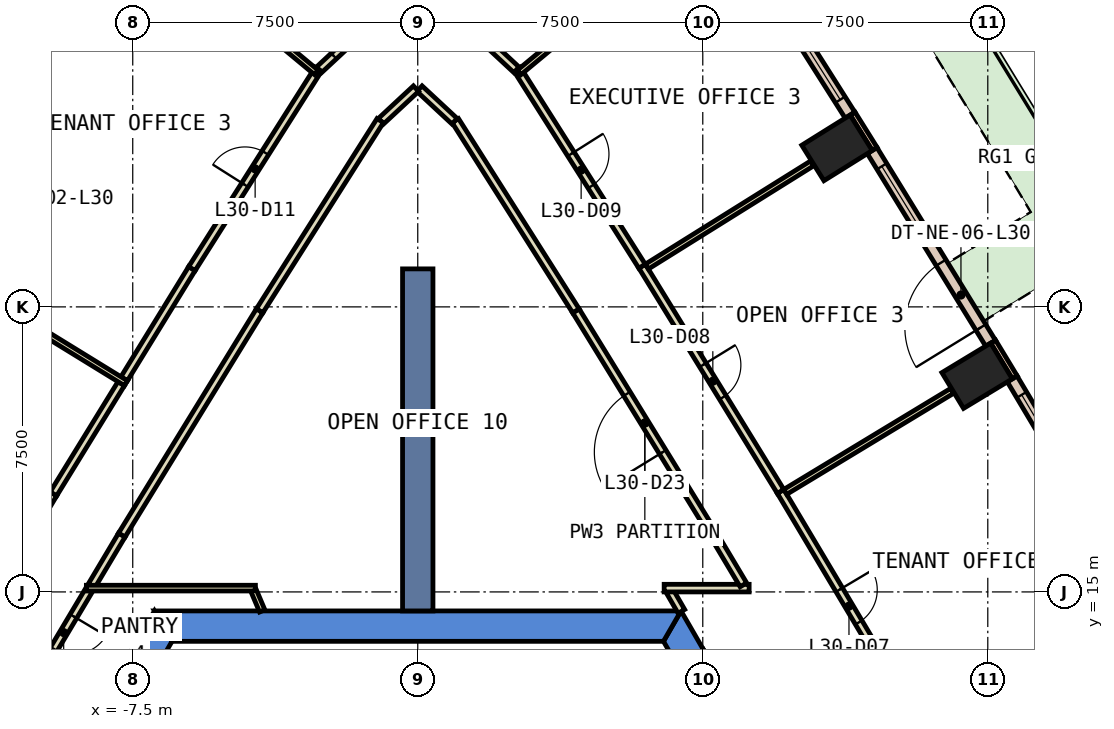
"""IFC4 building model, lengths in metres.
Left out: names, types, materials, properties, quantities, classifications, styles, units other than length and angle.
Written with IfcOpenShell. Run it as: python <this file> out.ifc"""

import sys

from ifc_helpers import new_model, si_unit, direction, frame, frame_2d, origin, origin_2d, place, context, subcontext, project, spatial, polyline, rectangle, outline, extrude, element, fill, save


model = new_model("IFC4")
c1 = context("Model", 3, precision=1e-05, world=origin(), true_north=direction((0.0, 1.0)))
c2 = subcontext(c1, "Body", "Model", "MODEL_VIEW")
j1 = project(units=[si_unit("LENGTHUNIT", "METRE"), si_unit("PLANEANGLEUNIT", "RADIAN")], contexts=[c1])
p1 = place(None, origin())
s1 = spatial("IfcSite", under=j1, at=p1, CompositionType="ELEMENT")
p2 = place(p1, origin())
s2 = spatial("IfcBuilding", under=s1, at=p2, CompositionType="ELEMENT")
p3 = place(p2, frame((0.0, 0.0, 138.2)))
s3 = spatial("IfcBuildingStorey", under=s2, at=p3, CompositionType="ELEMENT", Elevation=138.2)
for number, where, z_axis, x_axis in (
    (1, (14.719, 20.688, 0.0), (0.0, 0.0, 1.0), (-0.518, 0.855, 0.0)),
    (2, (11.033, 26.684, 0.0), (0.0, 0.0, 1.0), (-0.53, 0.848, 0.0)),
):
    element("IfcColumn", number, at=place(p3, frame(where, z_axis=z_axis, x_axis=x_axis)), inside=s3, PredefinedType="COLUMN", context=c2, shape_type="SweptSolid", body=[
        extrude(rectangle(XDim=1.1, YDim=1.5, at=origin_2d()), origin(), (0.0, 0.0, 1.0), 3.8),
    ])
p4 = place(p3, frame((0.0, 0.0, -0.6)))
e3 = element("IfcWall", 3, at=p4, inside=s3, PredefinedType="SHEAR", context=c2, shape_type="SweptSolid", body=[
    extrude(outline(polyline([(6.824, 13.08), (7.517, 13.48), (6.928, 14.5), (6.466, 13.7), (6.824, 13.08)])), origin(), (0.0, 0.0, 1.0), 4.4),
])
p5 = place(p3, frame((0.0, 0.0, -0.6)))
e4 = element("IfcWall", 4, at=p5, inside=s3, PredefinedType="SHEAR", context=c2, shape_type="SweptSolid", body=[
    extrude(outline(polyline([(6.928, 14.5), (-6.928, 14.5), (-6.466, 13.7), (6.466, 13.7), (6.928, 14.5)])), origin(), (0.0, 0.0, 1.0), 4.4),
])
p6 = place(p3, frame((0.0, 0.0, -0.6)))
e5 = element("IfcWall", 5, at=p6, inside=s3, PredefinedType="SHEAR", context=c2, shape_type="SweptSolid", body=[
    extrude(outline(polyline([(-12.267, 5.252), (-11.575, 4.852), (-6.466, 13.7), (-6.928, 14.5), (-12.267, 5.252)])), origin(), (0.0, 0.0, 1.0), 4.4),
])
p7 = place(p3, frame((0.0, 14.5, -0.6), z_axis=(0.0, 0.0, 1.0), x_axis=(0.0, 1.0, 0.0)))
e6 = element("IfcWall", 6, at=p7, inside=s3, PredefinedType="SHEAR", context=c2, shape_type="SweptSolid", body=[
    extrude(rectangle(XDim=9.0, YDim=0.8, at=frame_2d((4.5, 0.0))), origin(), (0.0, 0.0, 1.0), 4.4),
])
for number, where, z_axis, x_axis in (
    (7, (15.71, 20.645, 0.0), (0.0, 0.0, 1.0), (-0.518, 0.855, 0.0)),
    (8, (12.024, 26.655, 0.0), (0.0, 0.0, 1.0), (-0.53, 0.848, 0.0)),
):
    element("IfcWall", number, at=place(p3, frame(where, z_axis=z_axis, x_axis=x_axis)), inside=s3, PredefinedType="STANDARD", context=c2, shape_type="SweptSolid", body=[
        extrude(rectangle(XDim=1.1, YDim=0.15, at=frame_2d((0.55, 0.0))), origin(), (0.0, 0.0, 1.0), 3.8),
    ])
p8 = place(p3, frame((18.688, 15.493, 0.0), z_axis=(0.0, 0.0, 1.0), x_axis=(-0.511856715331, 0.859070836992, 0.0)))
e9 = element("IfcWall", 9, at=p8, inside=s3, PredefinedType="STANDARD", context=c2, shape_type="SweptSolid", body=[
    extrude(rectangle(XDim=5.951, YDim=0.3, at=frame_2d((2.975, 0.0))), origin(), (0.0, 0.0, 1.0), 3.8),
])
p9 = place(p8, frame((0.488, 0.0, 0.9)))
e10 = element("IfcOpeningElement", 10, at=p9, cuts=e9, PredefinedType="OPENING", context=c2, shape_type="SweptSolid", body=[
    extrude(rectangle(XDim=2.0, YDim=2.6, at=frame_2d((1.0, 1.3))), frame((0.0, 0.16, 0.0), z_axis=(0.0, -1.0, 0.0), x_axis=(1.0, 0.0, 0.0)), (0.0, 0.0, 1.0), 0.32),
])
p10 = place(p8, frame((3.463, 0.0, 0.9)))
e11 = element("IfcOpeningElement", 11, at=p10, cuts=e9, PredefinedType="OPENING", context=c2, shape_type="SweptSolid", body=[
    extrude(rectangle(XDim=2.0, YDim=2.6, at=frame_2d((1.0, 1.3))), frame((0.0, 0.16, 0.0), z_axis=(0.0, -1.0, 0.0), x_axis=(1.0, 0.0, 0.0)), (0.0, 0.0, 1.0), 0.32),
])
p11 = place(p3, frame((15.073, 21.544, 0.0), z_axis=(0.0, 0.0, 1.0), x_axis=(-0.523719731127, 0.851890628677, 0.0)))
e12 = element("IfcWall", 12, at=p11, inside=s3, PredefinedType="STANDARD", context=c2, shape_type="SweptSolid", body=[
    extrude(rectangle(XDim=5.952, YDim=0.3, at=frame_2d((2.976, 0.0))), origin(), (0.0, 0.0, 1.0), 3.8),
])
p12 = place(p11, frame((0.488, 0.0, 0.0)))
e13 = element("IfcOpeningElement", 13, at=p12, cuts=e12, PredefinedType="OPENING", context=c2, shape_type="SweptSolid", body=[
    extrude(rectangle(XDim=2.0, YDim=2.4, at=frame_2d((1.0, 1.2))), frame((0.0, 0.16, 0.0), z_axis=(0.0, -1.0, 0.0), x_axis=(1.0, 0.0, 0.0)), (0.0, 0.0, 1.0), 0.32),
])
p13 = place(p11, frame((3.464, 0.0, 0.9)))
e14 = element("IfcOpeningElement", 14, at=p13, cuts=e12, PredefinedType="OPENING", context=c2, shape_type="SweptSolid", body=[
    extrude(rectangle(XDim=2.0, YDim=2.6, at=frame_2d((1.0, 1.3))), frame((0.0, 0.16, 0.0), z_axis=(0.0, -1.0, 0.0), x_axis=(1.0, 0.0, 0.0)), (0.0, 0.0, 1.0), 0.32),
])
p14 = place(p3, frame((11.375, 27.545, 0.0), z_axis=(0.0, 0.0, 1.0), x_axis=(-0.535403761464, 0.844596242124, 0.0)))
e15 = element("IfcWall", 15, at=p14, inside=s3, PredefinedType="STANDARD", context=c2, shape_type="SweptSolid", body=[
    extrude(rectangle(XDim=5.928, YDim=0.3, at=frame_2d((2.964, 0.0))), origin(), (0.0, 0.0, 1.0), 3.8),
])
p15 = place(p14, frame((0.482, 0.0, 0.9)))
e16 = element("IfcOpeningElement", 16, at=p15, cuts=e15, PredefinedType="OPENING", context=c2, shape_type="SweptSolid", body=[
    extrude(rectangle(XDim=2.0, YDim=2.6, at=frame_2d((1.0, 1.3))), frame((0.0, 0.16, 0.0), z_axis=(0.0, -1.0, 0.0), x_axis=(1.0, 0.0, 0.0)), (0.0, 0.0, 1.0), 0.32),
])
p16 = place(p14, frame((3.446, 0.0, 0.9)))
e17 = element("IfcOpeningElement", 17, at=p16, cuts=e15, PredefinedType="OPENING", context=c2, shape_type="SweptSolid", body=[
    extrude(rectangle(XDim=2.0, YDim=2.6, at=frame_2d((1.0, 1.3))), frame((0.0, 0.16, 0.0), z_axis=(0.0, -1.0, 0.0), x_axis=(1.0, 0.0, 0.0)), (0.0, 0.0, 1.0), 0.32),
])
p17 = place(p3, frame((-8.201, 32.552, 0.0), z_axis=(0.0, 0.0, 1.0), x_axis=(-0.535403761464, -0.844596242124, 0.0)))
e18 = element("IfcWall", 18, at=p17, inside=s3, PredefinedType="STANDARD", context=c2, shape_type="SweptSolid", body=[
    extrude(rectangle(XDim=5.928, YDim=0.3, at=frame_2d((2.964, 0.0))), origin(), (0.0, 0.0, 1.0), 3.8),
])
p18 = place(p17, frame((0.482, 0.0, 0.9)))
e19 = element("IfcOpeningElement", 19, at=p18, cuts=e18, PredefinedType="OPENING", context=c2, shape_type="SweptSolid", body=[
    extrude(rectangle(XDim=2.0, YDim=2.6, at=frame_2d((1.0, 1.3))), frame((0.0, 0.16, 0.0), z_axis=(0.0, -1.0, 0.0), x_axis=(1.0, 0.0, 0.0)), (0.0, 0.0, 1.0), 0.32),
])
p19 = place(p17, frame((3.446, 0.0, 0.9)))
e20 = element("IfcOpeningElement", 20, at=p19, cuts=e18, PredefinedType="OPENING", context=c2, shape_type="SweptSolid", body=[
    extrude(rectangle(XDim=2.0, YDim=2.6, at=frame_2d((1.0, 1.3))), frame((0.0, 0.16, 0.0), z_axis=(0.0, -1.0, 0.0), x_axis=(1.0, 0.0, 0.0)), (0.0, 0.0, 1.0), 0.32),
])
p20 = place(p3, frame((-8.658, 15.036, 0.0), z_axis=(0.0, 0.0, 1.0), x_axis=(-0.511860217954, -0.859068750029, 0.0)))
e21 = element("IfcWall", 21, at=p20, inside=s3, PredefinedType="PARTITIONING", context=c2, shape_type="SweptSolid", body=[
    extrude(rectangle(XDim=2.577, YDim=0.2, at=frame_2d((1.289, 0.0))), origin(), (0.0, 0.0, 1.0), 3.8),
])
p21 = place(p20, frame((0.788, 0.0, 0.0)))
e22 = element("IfcOpeningElement", 22, at=p21, cuts=e21, PredefinedType="OPENING", context=c2, shape_type="SweptSolid", body=[
    extrude(rectangle(XDim=1.0, YDim=2.1, at=frame_2d((0.5, 1.05))), frame((0.0, 0.11, 0.0), z_axis=(0.0, -1.0, 0.0), x_axis=(1.0, 0.0, 0.0)), (0.0, 0.0, 1.0), 0.22),
])
p22 = place(p3, frame((6.937, 14.488, 0.0), z_axis=(0.0, 0.0, 1.0), x_axis=(-0.499908430952, 0.866078264744, 0.0)))
e23 = element("IfcWall", 23, at=p22, inside=s3, PredefinedType="PARTITIONING", context=c2, shape_type="SweptSolid", body=[
    extrude(rectangle(XDim=0.606, YDim=0.2, at=frame_2d((0.303, 0.0))), origin(), (0.0, 0.0, 1.0), 3.8),
])
p23 = place(p3, frame((6.484, 15.1, 0.0), z_axis=(0.0, 0.0, 1.0), x_axis=(1.0, 0.0, 0.0)))
e24 = element("IfcWall", 24, at=p23, inside=s3, PredefinedType="PARTITIONING", context=c2, shape_type="SweptSolid", body=[
    extrude(rectangle(XDim=2.236, YDim=0.2, at=frame_2d((1.118, 0.0))), origin(), (0.0, 0.0, 1.0), 3.8),
])
p24 = place(p3, frame((8.569, 15.186, 0.0), z_axis=(0.0, 0.0, 1.0), x_axis=(-0.512230585803, 0.85884796499, 0.0)))
e25 = element("IfcWall", 25, at=p24, inside=s3, PredefinedType="PARTITIONING", context=c2, shape_type="SweptSolid", body=[
    extrude(rectangle(XDim=1.523, YDim=0.2, at=frame_2d((0.761, 0.0))), origin(), (0.0, 0.0, 1.0), 3.8),
])
p25 = place(p3, frame((7.789, 16.494, 0.0), z_axis=(0.0, 0.0, 1.0), x_axis=(-0.523625371849, 0.851948631055, 0.0)))
e26 = element("IfcWall", 26, at=p25, inside=s3, PredefinedType="PARTITIONING", context=c2, shape_type="SweptSolid", body=[
    extrude(rectangle(XDim=6.927, YDim=0.2, at=frame_2d((3.463, 0.0))), origin(), (0.0, 0.0, 1.0), 3.8),
])
p26 = place(p25, frame((2.564, 0.0, 0.0)))
e27 = element("IfcOpeningElement", 27, at=p26, cuts=e26, PredefinedType="OPENING", context=c2, shape_type="SweptSolid", body=[
    extrude(rectangle(XDim=1.8, YDim=2.1, at=frame_2d((0.9, 1.05))), frame((0.0, 0.11, 0.0), z_axis=(0.0, -1.0, 0.0), x_axis=(1.0, 0.0, 0.0)), (0.0, 0.0, 1.0), 0.22),
])
p27 = place(p3, frame((4.162, 22.395, 0.0), z_axis=(0.0, 0.0, 1.0), x_axis=(-0.535496886312, 0.844537201519, 0.0)))
e28 = element("IfcWall", 28, at=p27, inside=s3, PredefinedType="PARTITIONING", context=c2, shape_type="SweptSolid", body=[
    extrude(rectangle(XDim=5.927, YDim=0.2, at=frame_2d((2.964, 0.0))), origin(), (0.0, 0.0, 1.0), 3.8),
])
for number, where, z_axis, x_axis in (
    (29, (0.968, 27.385, 0.0), (0.0, 0.0, 1.0), (-0.733, 0.681, 0.0)),
    (30, (-0.046, 28.242, 0.0), (0.0, 0.0, 1.0), (-0.733, -0.681, 0.0)),
):
    element("IfcWall", number, at=place(p3, frame(where, z_axis=z_axis, x_axis=x_axis)), inside=s3, PredefinedType="PARTITIONING", context=c2, shape_type="SweptSolid", body=[
        extrude(rectangle(XDim=1.259, YDim=0.2, at=frame_2d((0.629, 0.0))), origin(), (0.0, 0.0, 1.0), 3.8),
    ])
p28 = place(p3, frame((-0.988, 27.401, 0.0), z_axis=(0.0, 0.0, 1.0), x_axis=(-0.535496886312, -0.844537201519, 0.0)))
e31 = element("IfcWall", 31, at=p28, inside=s3, PredefinedType="PARTITIONING", context=c2, shape_type="SweptSolid", body=[
    extrude(rectangle(XDim=5.927, YDim=0.2, at=frame_2d((2.964, 0.0))), origin(), (0.0, 0.0, 1.0), 3.8),
])
p29 = place(p3, frame((-4.162, 22.395, 0.0), z_axis=(0.0, 0.0, 1.0), x_axis=(-0.523625371849, -0.851948631055, 0.0)))
e32 = element("IfcWall", 32, at=p29, inside=s3, PredefinedType="PARTITIONING", context=c2, shape_type="SweptSolid", body=[
    extrude(rectangle(XDim=6.927, YDim=0.2, at=frame_2d((3.463, 0.0))), origin(), (0.0, 0.0, 1.0), 3.8),
])
p30 = place(p3, frame((-7.789, 16.494, 0.0), z_axis=(0.0, 0.0, 1.0), x_axis=(-0.511686277462, -0.859172365394, 0.0)))
e33 = element("IfcWall", 33, at=p30, inside=s3, PredefinedType="PARTITIONING", context=c2, shape_type="SweptSolid", body=[
    extrude(rectangle(XDim=1.548, YDim=0.2, at=frame_2d((0.774, 0.0))), origin(), (0.0, 0.0, 1.0), 3.8),
])
p31 = place(p3, frame((9.548, 17.645, 0.0), z_axis=(0.0, 0.0, 1.0), x_axis=(0.511822081848, -0.859091471575, 0.0)))
e34 = element("IfcWall", 34, at=p31, inside=s3, PredefinedType="PARTITIONING", context=c2, shape_type="SweptSolid", body=[
    extrude(rectangle(XDim=7.03, YDim=0.2, at=frame_2d((3.515, 0.0))), origin(), (0.0, 0.0, 1.0), 3.8),
])
p32 = place(p31, frame((3.015, 0.0, 0.0)))
e35 = element("IfcOpeningElement", 35, at=p32, cuts=e34, PredefinedType="OPENING", context=c2, shape_type="SweptSolid", body=[
    extrude(rectangle(XDim=1.0, YDim=2.1, at=frame_2d((0.5, 1.05))), frame((0.0, 0.11, 0.0), z_axis=(0.0, -1.0, 0.0), x_axis=(1.0, 0.0, 0.0)), (0.0, 0.0, 1.0), 0.22),
])
p33 = place(p3, frame((5.904, 23.571, 0.0), z_axis=(0.0, 0.0, 1.0), x_axis=(0.523647026552, -0.851935321244, 0.0)))
e36 = element("IfcWall", 36, at=p33, inside=s3, PredefinedType="PARTITIONING", context=c2, shape_type="SweptSolid", body=[
    extrude(rectangle(XDim=6.957, YDim=0.2, at=frame_2d((3.479, 0.0))), origin(), (0.0, 0.0, 1.0), 3.8),
])
p34 = place(p33, frame((3.053, 0.0, 0.0)))
e37 = element("IfcOpeningElement", 37, at=p34, cuts=e36, PredefinedType="OPENING", context=c2, shape_type="SweptSolid", body=[
    extrude(rectangle(XDim=1.0, YDim=2.1, at=frame_2d((0.5, 1.05))), frame((0.0, 0.11, 0.0), z_axis=(0.0, -1.0, 0.0), x_axis=(1.0, 0.0, 0.0)), (0.0, 0.0, 1.0), 0.22),
])
p35 = place(p3, frame((2.616, 28.754, 0.0), z_axis=(0.0, 0.0, 1.0), x_axis=(0.535405016332, -0.844595446641, 0.0)))
e38 = element("IfcWall", 38, at=p35, inside=s3, PredefinedType="PARTITIONING", context=c2, shape_type="SweptSolid", body=[
    extrude(rectangle(XDim=6.138, YDim=0.2, at=frame_2d((3.069, 0.0))), origin(), (0.0, 0.0, 1.0), 3.8),
])
p36 = place(p35, frame((2.644, 0.0, 0.0)))
e39 = element("IfcOpeningElement", 39, at=p36, cuts=e38, PredefinedType="OPENING", context=c2, shape_type="SweptSolid", body=[
    extrude(rectangle(XDim=1.0, YDim=2.1, at=frame_2d((0.5, 1.05))), frame((0.0, 0.11, 0.0), z_axis=(0.0, -1.0, 0.0), x_axis=(1.0, 0.0, 0.0)), (0.0, 0.0, 1.0), 0.22),
])
p37 = place(p3, frame((-2.597, 28.738, 0.0), z_axis=(0.0, 0.0, 1.0), x_axis=(0.73206471367, 0.681235095249, 0.0)))
e40 = element("IfcWall", 40, at=p37, inside=s3, PredefinedType="PARTITIONING", context=c2, shape_type="SweptSolid", body=[
    extrude(rectangle(XDim=2.065, YDim=0.2, at=frame_2d((1.033, 0.0))), origin(), (0.0, 0.0, 1.0), 3.8),
])
p38 = place(p37, frame((0.532, 0.0, 0.0)))
e41 = element("IfcOpeningElement", 41, at=p38, cuts=e40, PredefinedType="OPENING", context=c2, shape_type="SweptSolid", body=[
    extrude(rectangle(XDim=1.0, YDim=2.1, at=frame_2d((0.5, 1.05))), frame((0.0, 0.11, 0.0), z_axis=(0.0, -1.0, 0.0), x_axis=(1.0, 0.0, 0.0)), (0.0, 0.0, 1.0), 0.22),
])
p39 = place(p3, frame((1.085, 30.145, 0.0), z_axis=(0.0, 0.0, 1.0), x_axis=(0.73206471367, -0.681235095249, 0.0)))
e42 = element("IfcWall", 42, at=p39, inside=s3, PredefinedType="PARTITIONING", context=c2, shape_type="SweptSolid", body=[
    extrude(rectangle(XDim=2.065, YDim=0.2, at=frame_2d((1.033, 0.0))), origin(), (0.0, 0.0, 1.0), 3.8),
])
p40 = place(p3, frame((-7.725, 20.608, 0.0), z_axis=(0.0, 0.0, 1.0), x_axis=(0.523645038298, 0.851936543333, 0.0)))
e43 = element("IfcWall", 43, at=p40, inside=s3, PredefinedType="PARTITIONING", context=c2, shape_type="SweptSolid", body=[
    extrude(rectangle(XDim=3.403, YDim=0.2, at=frame_2d((1.702, 0.0))), origin(), (0.0, 0.0, 1.0), 3.8),
])
p41 = place(p3, frame((-5.943, 23.507, 0.0), z_axis=(0.0, 0.0, 1.0), x_axis=(0.535529721247, 0.844516380931, 0.0)))
e44 = element("IfcWall", 44, at=p41, inside=s3, PredefinedType="PARTITIONING", context=c2, shape_type="SweptSolid", body=[
    extrude(rectangle(XDim=6.213, YDim=0.2, at=frame_2d((3.106, 0.0))), origin(), (0.0, 0.0, 1.0), 3.8),
])
p42 = place(p41, frame((2.607, 0.0, 0.0)))
e45 = element("IfcOpeningElement", 45, at=p42, cuts=e44, PredefinedType="OPENING", context=c2, shape_type="SweptSolid", body=[
    extrude(rectangle(XDim=1.0, YDim=2.1, at=frame_2d((0.5, 1.05))), frame((0.0, 0.11, 0.0), z_axis=(0.0, -1.0, 0.0), x_axis=(1.0, 0.0, 0.0)), (0.0, 0.0, 1.0), 0.22),
])
p43 = place(p3, frame((-13.184, 11.542, 0.0), z_axis=(0.0, 0.0, 1.0), x_axis=(0.511847713534, 0.859076200433, 0.0)))
e46 = element("IfcWall", 46, at=p43, inside=s3, PredefinedType="PARTITIONING", context=c2, shape_type="SweptSolid", body=[
    extrude(rectangle(XDim=7.03, YDim=0.2, at=frame_2d((3.515, 0.0))), origin(), (0.0, 0.0, 1.0), 3.8),
])
p44 = place(p43, frame((3.015, 0.0, 0.0)))
e47 = element("IfcOpeningElement", 47, at=p44, cuts=e46, PredefinedType="OPENING", context=c2, shape_type="SweptSolid", body=[
    extrude(rectangle(XDim=1.0, YDim=2.1, at=frame_2d((0.5, 1.05))), frame((0.0, 0.11, 0.0), z_axis=(0.0, -1.0, 0.0), x_axis=(1.0, 0.0, 0.0)), (0.0, 0.0, 1.0), 0.22),
])
p45 = place(p3, frame((-9.586, 17.581, 0.0), z_axis=(0.0, 0.0, 1.0), x_axis=(0.523757261565, 0.851867554822, 0.0)))
e48 = element("IfcWall", 48, at=p45, inside=s3, PredefinedType="PARTITIONING", context=c2, shape_type="SweptSolid", body=[
    extrude(rectangle(XDim=3.404, YDim=0.2, at=frame_2d((1.702, 0.0))), origin(), (0.0, 0.0, 1.0), 3.8),
])
p46 = place(p3, frame((-4.272, 15.1, 0.0), z_axis=(0.0, 0.0, 1.0), x_axis=(-1.0, 0.0, 0.0)))
e49 = element("IfcWall", 49, at=p46, inside=s3, PredefinedType="PARTITIONING", context=c2, shape_type="SweptSolid", body=[
    extrude(rectangle(XDim=4.448, YDim=0.15, at=frame_2d((2.224, 0.0))), origin(), (0.0, 0.0, 1.0), 3.8),
])
p47 = place(p3, frame((-4.093, 14.5, 0.0), z_axis=(0.0, 0.0, 1.0), x_axis=(-0.390288929197, 0.92069243059, 0.0)))
e50 = element("IfcWall", 50, at=p47, inside=s3, PredefinedType="PARTITIONING", context=c2, shape_type="SweptSolid", body=[
    extrude(rectangle(XDim=0.577, YDim=0.15, at=frame_2d((0.288, 0.0))), origin(), (0.0, 0.0, 1.0), 3.8),
])
p48 = place(p3, frame((9.671, 17.633, 0.0), z_axis=(0.0, 0.0, 1.0), x_axis=(0.855551112805, 0.517718353332, 0.0)))
e51 = element("IfcWall", 51, at=p48, inside=s3, PredefinedType="PARTITIONING", context=c2, shape_type="SweptSolid", body=[
    extrude(rectangle(XDim=5.13, YDim=0.15, at=frame_2d((2.565, 0.0))), origin(), (0.0, 0.0, 1.0), 3.8),
])
p49 = place(p3, frame((6.028, 23.56, 0.0), z_axis=(0.0, 0.0, 1.0), x_axis=(0.848246841914, 0.529601071734, 0.0)))
e52 = element("IfcWall", 52, at=p49, inside=s3, PredefinedType="PARTITIONING", context=c2, shape_type="SweptSolid", body=[
    extrude(rectangle(XDim=5.13, YDim=0.15, at=frame_2d((2.565, 0.0))), origin(), (0.0, 0.0, 1.0), 3.8),
])
for number, where, z_axis, x_axis in (
    (53, (2.67, 28.67, 0.0), (0.0, 0.0, 1.0), (0.769, 0.639, 0.0)),
    (54, (-2.67, 28.67, 0.0), (0.0, 0.0, 1.0), (-0.769, 0.639, 0.0)),
):
    element("IfcWall", number, at=place(p3, frame(where, z_axis=z_axis, x_axis=x_axis)), inside=s3, PredefinedType="PARTITIONING", context=c2, shape_type="SweptSolid", body=[
        extrude(rectangle(XDim=5.288, YDim=0.15, at=frame_2d((2.644, 0.0))), origin(), (0.0, 0.0, 1.0), 3.8),
    ])
p50 = place(p3, frame((-7.679, 20.492, 0.0), z_axis=(0.0, 0.0, 1.0), x_axis=(-0.851897179877, 0.523709074695, 0.0)))
e55 = element("IfcWall", 55, at=p50, inside=s3, PredefinedType="PARTITIONING", context=c2, shape_type="SweptSolid", body=[
    extrude(rectangle(XDim=6.7, YDim=0.15, at=frame_2d((3.35, 0.0))), origin(), (0.0, 0.0, 1.0), 3.8),
])
p51 = place(p10, origin())
e56 = element("IfcWindow", 56, at=p51, inside=s3, PartitioningType="SINGLE_PANEL", PredefinedType="WINDOW", context=c2, shape_type="SweptSolid", body=[
    extrude(rectangle(XDim=2.0, YDim=2.6, at=frame_2d((1.0, 1.3))), frame((0.0, 0.03, 0.0), z_axis=(0.0, -1.0, 0.0), x_axis=(1.0, 0.0, 0.0)), (0.0, 0.0, 1.0), 0.06),
])
fill(e11, e56)
p52 = place(p12, origin())
e57 = element("IfcDoor", 57, at=p52, inside=s3, OperationType="SLIDING_TO_LEFT", PredefinedType="DOOR", context=c2, shape_type="SweptSolid", body=[
    extrude(rectangle(XDim=2.0, YDim=2.4, at=frame_2d((1.0, 1.2))), frame((0.0, 0.025, 0.0), z_axis=(0.0, -1.0, 0.0), x_axis=(1.0, 0.0, 0.0)), (0.0, 0.0, 1.0), 0.05),
])
fill(e13, e57)
p53 = place(p13, origin())
e58 = element("IfcWindow", 58, at=p53, inside=s3, PartitioningType="SINGLE_PANEL", PredefinedType="WINDOW", context=c2, shape_type="SweptSolid", body=[
    extrude(rectangle(XDim=2.0, YDim=2.6, at=frame_2d((1.0, 1.3))), frame((0.0, 0.03, 0.0), z_axis=(0.0, -1.0, 0.0), x_axis=(1.0, 0.0, 0.0)), (0.0, 0.0, 1.0), 0.06),
])
fill(e14, e58)
p54 = place(p15, origin())
e59 = element("IfcWindow", 59, at=p54, inside=s3, PartitioningType="SINGLE_PANEL", PredefinedType="WINDOW", context=c2, shape_type="SweptSolid", body=[
    extrude(rectangle(XDim=2.0, YDim=2.6, at=frame_2d((1.0, 1.3))), frame((0.0, 0.03, 0.0), z_axis=(0.0, -1.0, 0.0), x_axis=(1.0, 0.0, 0.0)), (0.0, 0.0, 1.0), 0.06),
])
fill(e16, e59)
p55 = place(p32, origin())
e60 = element("IfcDoor", 60, at=p55, inside=s3, OperationType="SINGLE_SWING_RIGHT", PredefinedType="DOOR", context=c2, shape_type="SweptSolid", body=[
    extrude(rectangle(XDim=1.0, YDim=2.1, at=frame_2d((0.5, 1.05))), frame((0.0, 0.025, 0.0), z_axis=(0.0, -1.0, 0.0), x_axis=(1.0, 0.0, 0.0)), (0.0, 0.0, 1.0), 0.05),
])
fill(e35, e60)
p56 = place(p34, origin())
e61 = element("IfcDoor", 61, at=p56, inside=s3, OperationType="SINGLE_SWING_LEFT", PredefinedType="DOOR", context=c2, shape_type="SweptSolid", body=[
    extrude(rectangle(XDim=1.0, YDim=2.1, at=frame_2d((0.5, 1.05))), frame((0.0, 0.025, 0.0), z_axis=(0.0, -1.0, 0.0), x_axis=(1.0, 0.0, 0.0)), (0.0, 0.0, 1.0), 0.05),
])
fill(e37, e61)
p57 = place(p36, origin())
e62 = element("IfcDoor", 62, at=p57, inside=s3, OperationType="SINGLE_SWING_LEFT", PredefinedType="DOOR", context=c2, shape_type="SweptSolid", body=[
    extrude(rectangle(XDim=1.0, YDim=2.1, at=frame_2d((0.5, 1.05))), frame((0.0, 0.025, 0.0), z_axis=(0.0, -1.0, 0.0), x_axis=(1.0, 0.0, 0.0)), (0.0, 0.0, 1.0), 0.05),
])
fill(e39, e62)
p58 = place(p38, origin())
e63 = element("IfcDoor", 63, at=p58, inside=s3, OperationType="SINGLE_SWING_LEFT", PredefinedType="DOOR", context=c2, shape_type="SweptSolid", body=[
    extrude(rectangle(XDim=1.0, YDim=2.1, at=frame_2d((0.5, 1.05))), frame((0.0, 0.025, 0.0), z_axis=(0.0, -1.0, 0.0), x_axis=(1.0, 0.0, 0.0)), (0.0, 0.0, 1.0), 0.05),
])
fill(e41, e63)
p59 = place(p42, origin())
e64 = element("IfcDoor", 64, at=p59, inside=s3, OperationType="SINGLE_SWING_LEFT", PredefinedType="DOOR", context=c2, shape_type="SweptSolid", body=[
    extrude(rectangle(XDim=1.0, YDim=2.1, at=frame_2d((0.5, 1.05))), frame((0.0, 0.025, 0.0), z_axis=(0.0, -1.0, 0.0), x_axis=(1.0, 0.0, 0.0)), (0.0, 0.0, 1.0), 0.05),
])
fill(e45, e64)
p60 = place(p26, origin())
e65 = element("IfcDoor", 65, at=p60, inside=s3, OperationType="DOUBLE_DOOR_SINGLE_SWING", PredefinedType="DOOR", context=c2, shape_type="SweptSolid", body=[
    extrude(rectangle(XDim=1.8, YDim=2.1, at=frame_2d((0.9, 1.05))), frame((0.0, 0.025, 0.0), z_axis=(0.0, -1.0, 0.0), x_axis=(1.0, 0.0, 0.0)), (0.0, 0.0, 1.0), 0.05),
])
fill(e27, e65)
p61 = place(p21, origin())
e66 = element("IfcDoor", 66, at=p61, inside=s3, OperationType="SINGLE_SWING_LEFT", PredefinedType="DOOR", context=c2, shape_type="SweptSolid", body=[
    extrude(rectangle(XDim=1.0, YDim=2.1, at=frame_2d((0.5, 1.05))), frame((0.0, 0.025, 0.0), z_axis=(0.0, -1.0, 0.0), x_axis=(1.0, 0.0, 0.0)), (0.0, 0.0, 1.0), 0.05),
])
fill(e22, e66)
save(model, sys.argv[1])
